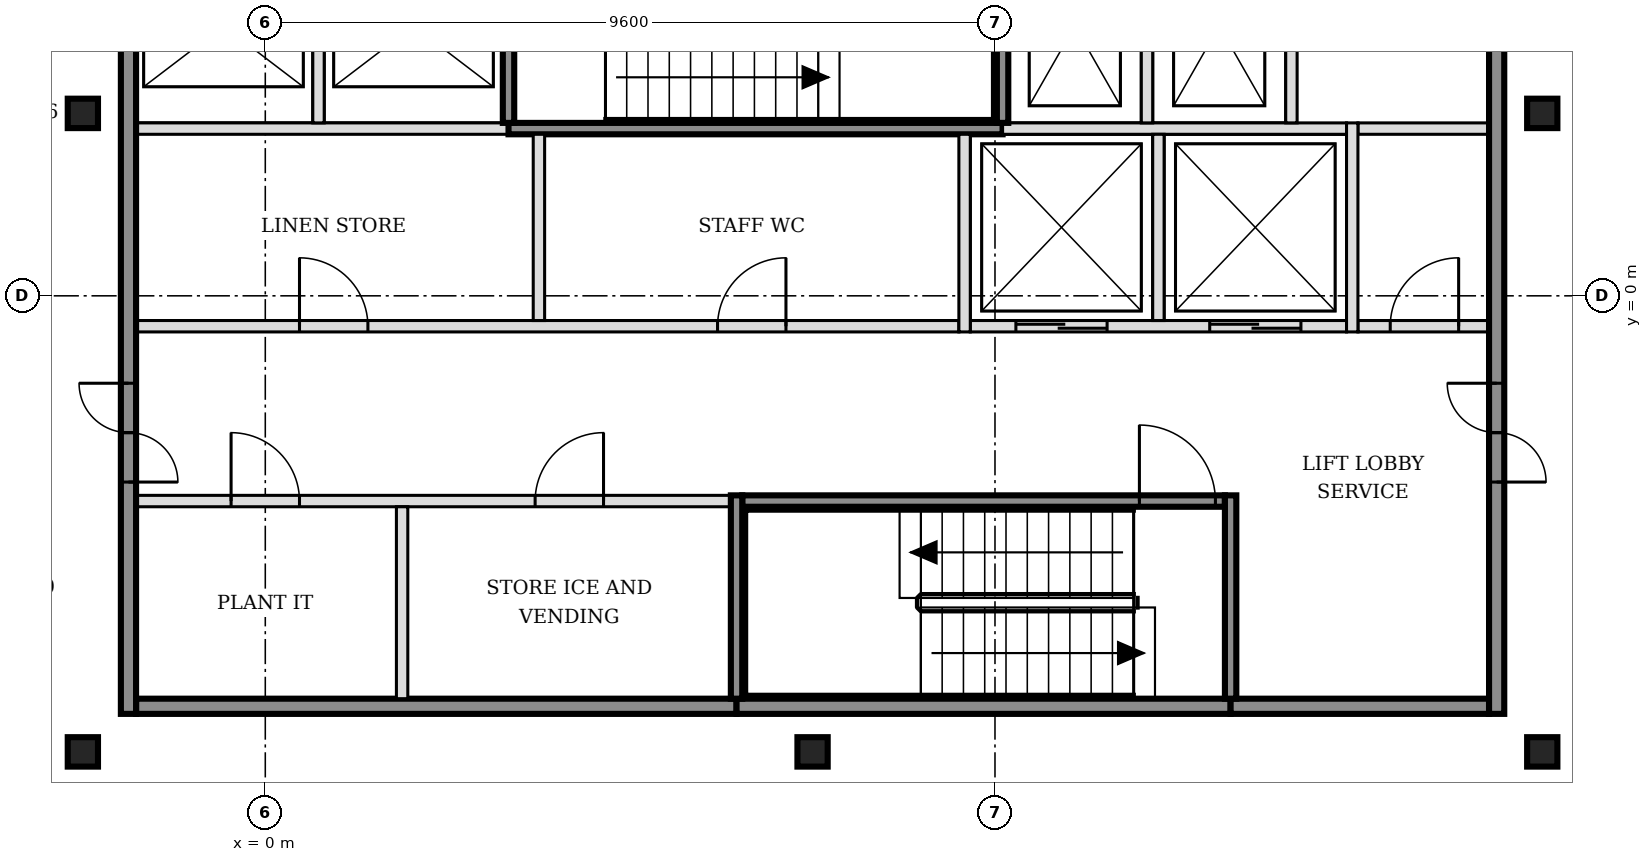
"""IFC4 building model, lengths in metres.
Left out: names, types, materials, properties, quantities, classifications, styles, units other than length and angle.
Written with IfcOpenShell. Run it as: python <this file> out.ifc"""

import sys

from ifc_helpers import new_model, si_unit, direction, frame, frame_2d, origin, origin_2d, place, context, subcontext, project, spatial, rectangle, i_section, extrude, element, fill, save


model = new_model("IFC4")
c1 = context("Model", 3, precision=1e-05, world=origin(), true_north=direction((0.0, 1.0)))
c2 = subcontext(c1, "Body", "Model", "MODEL_VIEW")
j1 = project(units=[si_unit("LENGTHUNIT", "METRE"), si_unit("PLANEANGLEUNIT", "RADIAN")], contexts=[c1])
p1 = place(None, origin())
s1 = spatial("IfcSite", under=j1, at=p1, CompositionType="ELEMENT")
p2 = place(p1, origin())
s2 = spatial("IfcBuilding", under=s1, at=p2, CompositionType="ELEMENT")
p3 = place(p2, frame((0.0, 0.0, 270.6)))
s3 = spatial("IfcBuildingStorey", under=s2, at=p3, CompositionType="ELEMENT", Elevation=270.6)
for number, where, z_axis, x_axis in (
    (1, (-2.4, -6.0, -0.15), (0.0, 0.0, 1.0), (1.0, 0.0, 0.0)),
    (2, (7.2, -6.0, -0.15), (0.0, 0.0, 1.0), (1.0, 0.0, 0.0)),
    (3, (16.8, -6.0, -0.15), (0.0, 0.0, 1.0), (1.0, 0.0, 0.0)),
    (4, (-2.4, 2.4, -0.15), (0.0, 0.0, 1.0), (1.0, 0.0, 0.0)),
    (5, (16.8, 2.4, -0.15), (0.0, 0.0, 1.0), (1.0, 0.0, 0.0)),
):
    element("IfcColumn", number, at=place(p3, frame(where, z_axis=z_axis, x_axis=x_axis)), inside=s3, PredefinedType="COLUMN", context=c2, shape_type="SweptSolid", body=[
        extrude(i_section(OverallWidth=0.398, OverallDepth=0.387, WebThickness=0.021, FlangeThickness=0.033, FilletRadius=0.015, at=origin_2d()), origin(), (0.0, 0.0, 1.0), 3.6),
    ])
p4 = place(p3, frame((-1.7, -5.4, 0.0), z_axis=(0.0, 0.0, 1.0), x_axis=(1.0, 0.0, 0.0)))
e6 = element("IfcWall", 6, at=p4, inside=s3, PredefinedType="SOLIDWALL", context=c2, shape_type="SweptSolid", body=[
    extrude(rectangle(XDim=7.9, YDim=0.2, at=frame_2d((3.95, 0.0))), origin(), (0.0, 0.0, 1.0), 3.45),
])
p5 = place(p3, frame((6.2, -5.4, 0.0), z_axis=(0.0, 0.0, 1.0), x_axis=(1.0, 0.0, 0.0)))
e7 = element("IfcWall", 7, at=p5, inside=s3, PredefinedType="SOLIDWALL", context=c2, shape_type="SweptSolid", body=[
    extrude(rectangle(XDim=6.5, YDim=0.2, at=frame_2d((3.25, 0.0))), origin(), (0.0, 0.0, 1.0), 3.45),
])
p6 = place(p3, frame((12.7, -5.4, 0.0), z_axis=(0.0, 0.0, 1.0), x_axis=(1.0, 0.0, 0.0)))
e8 = element("IfcWall", 8, at=p6, inside=s3, PredefinedType="SOLIDWALL", context=c2, shape_type="SweptSolid", body=[
    extrude(rectangle(XDim=3.4, YDim=0.2, at=frame_2d((1.7, 0.0))), origin(), (0.0, 0.0, 1.0), 3.45),
])
p7 = place(p3, frame((-1.7, -2.7, 0.0), z_axis=(0.0, 0.0, 1.0), x_axis=(1.0, 0.0, 0.0)))
e9 = element("IfcWall", 9, at=p7, inside=s3, PredefinedType="PARTITIONING", context=c2, shape_type="SweptSolid", body=[
    extrude(rectangle(XDim=7.825, YDim=0.15, at=frame_2d((3.913, 0.0))), origin(), (0.0, 0.0, 1.0), 3.45),
])
p8 = place(p7, frame((1.25, 0.0, 0.0)))
e10 = element("IfcOpeningElement", 10, at=p8, cuts=e9, PredefinedType="OPENING", context=c2, shape_type="SweptSolid", body=[
    extrude(rectangle(XDim=0.9, YDim=2.1, at=frame_2d((0.45, 1.05))), frame((0.0, 0.085, 0.0), z_axis=(0.0, -1.0, 0.0), x_axis=(1.0, 0.0, 0.0)), (0.0, 0.0, 1.0), 0.17),
])
p9 = place(p7, frame((5.25, 0.0, 0.0)))
e11 = element("IfcOpeningElement", 11, at=p9, cuts=e9, PredefinedType="OPENING", context=c2, shape_type="SweptSolid", body=[
    extrude(rectangle(XDim=0.9, YDim=2.1, at=frame_2d((0.45, 1.05))), frame((0.0, 0.085, 0.0), z_axis=(0.0, -1.0, 0.0), x_axis=(1.0, 0.0, 0.0)), (0.0, 0.0, 1.0), 0.17),
])
p10 = place(p3, frame((6.275, -2.7, 0.0), z_axis=(0.0, 0.0, 1.0), x_axis=(1.0, 0.0, 0.0)))
e12 = element("IfcWall", 12, at=p10, inside=s3, PredefinedType="SOLIDWALL", context=c2, shape_type="SweptSolid", body=[
    extrude(rectangle(XDim=6.35, YDim=0.15, at=frame_2d((3.175, 0.0))), origin(), (0.0, 0.0, 1.0), 3.45),
])
p11 = place(p10, frame((5.225, 0.0, 0.0)))
e13 = element("IfcOpeningElement", 13, at=p11, cuts=e12, PredefinedType="OPENING", context=c2, shape_type="SweptSolid", body=[
    extrude(rectangle(XDim=1.0, YDim=2.1, at=frame_2d((0.5, 1.05))), frame((0.0, 0.085, 0.0), z_axis=(0.0, -1.0, 0.0), x_axis=(1.0, 0.0, 0.0)), (0.0, 0.0, 1.0), 0.17),
])
p12 = place(p3, frame((-1.7, -0.4, 0.0), z_axis=(0.0, 0.0, 1.0), x_axis=(1.0, 0.0, 0.0)))
e14 = element("IfcWall", 14, at=p12, inside=s3, PredefinedType="PARTITIONING", context=c2, shape_type="SweptSolid", body=[
    extrude(rectangle(XDim=10.825, YDim=0.15, at=frame_2d((5.413, 0.0))), origin(), (0.0, 0.0, 1.0), 3.45),
])
p13 = place(p12, frame((2.15, 0.0, 0.0)))
e15 = element("IfcOpeningElement", 15, at=p13, cuts=e14, PredefinedType="OPENING", context=c2, shape_type="SweptSolid", body=[
    extrude(rectangle(XDim=0.9, YDim=2.1, at=frame_2d((0.45, 1.05))), frame((0.0, 0.085, 0.0), z_axis=(0.0, -1.0, 0.0), x_axis=(1.0, 0.0, 0.0)), (0.0, 0.0, 1.0), 0.17),
])
p14 = place(p12, frame((7.65, 0.0, 0.0)))
e16 = element("IfcOpeningElement", 16, at=p14, cuts=e14, PredefinedType="OPENING", context=c2, shape_type="SweptSolid", body=[
    extrude(rectangle(XDim=0.9, YDim=2.1, at=frame_2d((0.45, 1.05))), frame((0.0, 0.085, 0.0), z_axis=(0.0, -1.0, 0.0), x_axis=(1.0, 0.0, 0.0)), (0.0, 0.0, 1.0), 0.17),
])
p15 = place(p3, frame((9.275, -0.4, 0.0), z_axis=(0.0, 0.0, 1.0), x_axis=(1.0, 0.0, 0.0)))
e17 = element("IfcWall", 17, at=p15, inside=s3, PredefinedType="SOLIDWALL", context=c2, shape_type="SweptSolid", body=[
    extrude(rectangle(XDim=4.95, YDim=0.15, at=frame_2d((2.475, 0.0))), origin(), (0.0, 0.0, 1.0), 3.45),
])
p16 = place(p15, frame((0.6, 0.0, 0.0)))
e18 = element("IfcOpeningElement", 18, at=p16, cuts=e17, PredefinedType="OPENING", context=c2, shape_type="SweptSolid", body=[
    extrude(rectangle(XDim=1.2, YDim=2.1, at=frame_2d((0.6, 1.05))), frame((0.0, 0.085, 0.0), z_axis=(0.0, -1.0, 0.0), x_axis=(1.0, 0.0, 0.0)), (0.0, 0.0, 1.0), 0.17),
])
p17 = place(p15, frame((3.15, 0.0, 0.0)))
e19 = element("IfcOpeningElement", 19, at=p17, cuts=e17, PredefinedType="OPENING", context=c2, shape_type="SweptSolid", body=[
    extrude(rectangle(XDim=1.2, YDim=2.1, at=frame_2d((0.6, 1.05))), frame((0.0, 0.085, 0.0), z_axis=(0.0, -1.0, 0.0), x_axis=(1.0, 0.0, 0.0)), (0.0, 0.0, 1.0), 0.17),
])
p18 = place(p3, frame((14.375, -0.4, 0.0), z_axis=(0.0, 0.0, 1.0), x_axis=(1.0, 0.0, 0.0)))
e20 = element("IfcWall", 20, at=p18, inside=s3, PredefinedType="PARTITIONING", context=c2, shape_type="SweptSolid", body=[
    extrude(rectangle(XDim=1.725, YDim=0.15, at=frame_2d((0.863, 0.0))), origin(), (0.0, 0.0, 1.0), 3.45),
])
p19 = place(p18, frame((0.425, 0.0, 0.0)))
e21 = element("IfcOpeningElement", 21, at=p19, cuts=e20, PredefinedType="OPENING", context=c2, shape_type="SweptSolid", body=[
    extrude(rectangle(XDim=0.9, YDim=2.1, at=frame_2d((0.45, 1.05))), frame((0.0, 0.085, 0.0), z_axis=(0.0, -1.0, 0.0), x_axis=(1.0, 0.0, 0.0)), (0.0, 0.0, 1.0), 0.17),
])
p20 = place(p3, frame((-1.7, 2.2, 0.0), z_axis=(0.0, 0.0, 1.0), x_axis=(1.0, 0.0, 0.0)))
e22 = element("IfcWall", 22, at=p20, inside=s3, PredefinedType="SOLIDWALL", context=c2, shape_type="SweptSolid", body=[
    extrude(rectangle(XDim=4.9, YDim=0.15, at=frame_2d((2.45, 0.0))), origin(), (0.0, 0.0, 1.0), 3.45),
])
p21 = place(p3, frame((3.2, 2.2, 0.0), z_axis=(0.0, 0.0, 1.0), x_axis=(1.0, 0.0, 0.0)))
e23 = element("IfcWall", 23, at=p21, inside=s3, PredefinedType="SOLIDWALL", context=c2, shape_type="SweptSolid", body=[
    extrude(rectangle(XDim=6.5, YDim=0.15, at=frame_2d((3.25, 0.0))), origin(), (0.0, 0.0, 1.0), 3.45),
])
p22 = place(p3, frame((9.7, 2.2, 0.0), z_axis=(0.0, 0.0, 1.0), x_axis=(1.0, 0.0, 0.0)))
e24 = element("IfcWall", 24, at=p22, inside=s3, PredefinedType="SOLIDWALL", context=c2, shape_type="SweptSolid", body=[
    extrude(rectangle(XDim=4.525, YDim=0.15, at=frame_2d((2.263, 0.0))), origin(), (0.0, 0.0, 1.0), 3.45),
])
p23 = place(p3, frame((14.375, 2.2, 0.0), z_axis=(0.0, 0.0, 1.0), x_axis=(1.0, 0.0, 0.0)))
e25 = element("IfcWall", 25, at=p23, inside=s3, PredefinedType="PARTITIONING", context=c2, shape_type="SweptSolid", body=[
    extrude(rectangle(XDim=1.725, YDim=0.15, at=frame_2d((0.863, 0.0))), origin(), (0.0, 0.0, 1.0), 3.45),
])
p24 = place(p3, frame((-1.8, -5.5, 0.0), z_axis=(0.0, 0.0, 1.0), x_axis=(0.0, 1.0, 0.0)))
e26 = element("IfcWall", 26, at=p24, inside=s3, PredefinedType="SOLIDWALL", context=c2, shape_type="SweptSolid", body=[
    extrude(rectangle(XDim=15.8, YDim=0.2, at=frame_2d((7.9, 0.0))), origin(), (0.0, 0.0, 1.0), 3.45),
])
p25 = place(p24, frame((3.05, 0.0, 0.0)))
e27 = element("IfcOpeningElement", 27, at=p25, cuts=e26, PredefinedType="OPENING", context=c2, shape_type="SweptSolid", body=[
    extrude(rectangle(XDim=1.3, YDim=2.1, at=frame_2d((0.65, 1.05))), frame((0.0, 0.11, 0.0), z_axis=(0.0, -1.0, 0.0), x_axis=(1.0, 0.0, 0.0)), (0.0, 0.0, 1.0), 0.22),
])
p26 = place(p24, frame((11.45, 0.0, 0.0)))
e28 = element("IfcOpeningElement", 28, at=p26, cuts=e26, PredefinedType="OPENING", context=c2, shape_type="SweptSolid", body=[
    extrude(rectangle(XDim=1.3, YDim=2.1, at=frame_2d((0.65, 1.05))), frame((0.0, 0.11, 0.0), z_axis=(0.0, -1.0, 0.0), x_axis=(1.0, 0.0, 0.0)), (0.0, 0.0, 1.0), 0.22),
])
p27 = place(p3, frame((0.7, 2.275, 0.0), z_axis=(0.0, 0.0, 1.0), x_axis=(0.0, 1.0, 0.0)))
e29 = element("IfcWall", 29, at=p27, inside=s3, PredefinedType="SOLIDWALL", context=c2, shape_type="SweptSolid", body=[
    extrude(rectangle(XDim=2.55, YDim=0.15, at=frame_2d((1.275, 0.0))), origin(), (0.0, 0.0, 1.0), 3.45),
])
p28 = place(p3, frame((1.8, -5.3, 0.0), z_axis=(0.0, 0.0, 1.0), x_axis=(0.0, 1.0, 0.0)))
e30 = element("IfcWall", 30, at=p28, inside=s3, PredefinedType="PARTITIONING", context=c2, shape_type="SweptSolid", body=[
    extrude(rectangle(XDim=2.525, YDim=0.15, at=frame_2d((1.263, 0.0))), origin(), (0.0, 0.0, 1.0), 3.45),
])
p29 = place(p3, frame((3.2, 2.275, 0.0), z_axis=(0.0, 0.0, 1.0), x_axis=(0.0, 1.0, 0.0)))
e31 = element("IfcWall", 31, at=p29, inside=s3, PredefinedType="SOLIDWALL", context=c2, shape_type="SweptSolid", body=[
    extrude(rectangle(XDim=2.55, YDim=0.15, at=frame_2d((1.275, 0.0))), origin(), (0.0, 0.0, 1.0), 3.45),
])
p30 = place(p3, frame((3.6, -0.325, 0.0), z_axis=(0.0, 0.0, 1.0), x_axis=(0.0, 1.0, 0.0)))
e32 = element("IfcWall", 32, at=p30, inside=s3, PredefinedType="PARTITIONING", context=c2, shape_type="SweptSolid", body=[
    extrude(rectangle(XDim=2.45, YDim=0.15, at=frame_2d((1.225, 0.0))), origin(), (0.0, 0.0, 1.0), 3.45),
])
p31 = place(p3, frame((6.2, -5.3, 0.0), z_axis=(0.0, 0.0, 1.0), x_axis=(0.0, 1.0, 0.0)))
e33 = element("IfcWall", 33, at=p31, inside=s3, PredefinedType="SOLIDWALL", context=c2, shape_type="SweptSolid", body=[
    extrude(rectangle(XDim=2.675, YDim=0.15, at=frame_2d((1.337, 0.0))), origin(), (0.0, 0.0, 1.0), 3.45),
])
p32 = place(p3, frame((9.2, -0.475, 0.0), z_axis=(0.0, 0.0, 1.0), x_axis=(0.0, 1.0, 0.0)))
e34 = element("IfcWall", 34, at=p32, inside=s3, PredefinedType="SOLIDWALL", context=c2, shape_type="SweptSolid", body=[
    extrude(rectangle(XDim=2.6, YDim=0.15, at=frame_2d((1.3, 0.0))), origin(), (0.0, 0.0, 1.0), 3.45),
])
for number, where, z_axis, x_axis in (
    (35, (9.7, 2.275, 0.0), (0.0, 0.0, 1.0), (0.0, 1.0, 0.0)),
    (36, (11.6, 2.275, 0.0), (0.0, 0.0, 1.0), (0.0, 1.0, 0.0)),
):
    element("IfcWall", number, at=place(p3, frame(where, z_axis=z_axis, x_axis=x_axis)), inside=s3, PredefinedType="SOLIDWALL", context=c2, shape_type="SweptSolid", body=[
        extrude(rectangle(XDim=2.55, YDim=0.15, at=frame_2d((1.275, 0.0))), origin(), (0.0, 0.0, 1.0), 3.45),
    ])
p33 = place(p3, frame((11.75, -0.325, 0.0), z_axis=(0.0, 0.0, 1.0), x_axis=(0.0, 1.0, 0.0)))
e37 = element("IfcWall", 37, at=p33, inside=s3, PredefinedType="SOLIDWALL", context=c2, shape_type="SweptSolid", body=[
    extrude(rectangle(XDim=2.45, YDim=0.15, at=frame_2d((1.225, 0.0))), origin(), (0.0, 0.0, 1.0), 3.45),
])
p34 = place(p3, frame((12.7, -5.3, 0.0), z_axis=(0.0, 0.0, 1.0), x_axis=(0.0, 1.0, 0.0)))
e38 = element("IfcWall", 38, at=p34, inside=s3, PredefinedType="SOLIDWALL", context=c2, shape_type="SweptSolid", body=[
    extrude(rectangle(XDim=2.675, YDim=0.15, at=frame_2d((1.337, 0.0))), origin(), (0.0, 0.0, 1.0), 3.45),
])
p35 = place(p3, frame((13.5, 2.275, 0.0), z_axis=(0.0, 0.0, 1.0), x_axis=(0.0, 1.0, 0.0)))
e39 = element("IfcWall", 39, at=p35, inside=s3, PredefinedType="SOLIDWALL", context=c2, shape_type="SweptSolid", body=[
    extrude(rectangle(XDim=2.55, YDim=0.15, at=frame_2d((1.275, 0.0))), origin(), (0.0, 0.0, 1.0), 3.45),
])
p36 = place(p3, frame((14.3, -0.475, 0.0), z_axis=(0.0, 0.0, 1.0), x_axis=(0.0, 1.0, 0.0)))
e40 = element("IfcWall", 40, at=p36, inside=s3, PredefinedType="SOLIDWALL", context=c2, shape_type="SweptSolid", body=[
    extrude(rectangle(XDim=2.75, YDim=0.15, at=frame_2d((1.375, 0.0))), origin(), (0.0, 0.0, 1.0), 3.45),
])
p37 = place(p3, frame((16.2, -5.5, 0.0), z_axis=(0.0, 0.0, 1.0), x_axis=(0.0, 1.0, 0.0)))
e41 = element("IfcWall", 41, at=p37, inside=s3, PredefinedType="SOLIDWALL", context=c2, shape_type="SweptSolid", body=[
    extrude(rectangle(XDim=15.8, YDim=0.2, at=frame_2d((7.9, 0.0))), origin(), (0.0, 0.0, 1.0), 3.45),
])
p38 = place(p37, frame((3.05, 0.0, 0.0)))
e42 = element("IfcOpeningElement", 42, at=p38, cuts=e41, PredefinedType="OPENING", context=c2, shape_type="SweptSolid", body=[
    extrude(rectangle(XDim=1.3, YDim=2.1, at=frame_2d((0.65, 1.05))), frame((0.0, 0.11, 0.0), z_axis=(0.0, -1.0, 0.0), x_axis=(1.0, 0.0, 0.0)), (0.0, 0.0, 1.0), 0.22),
])
p39 = place(p37, frame((11.45, 0.0, 0.0)))
e43 = element("IfcOpeningElement", 43, at=p39, cuts=e41, PredefinedType="OPENING", context=c2, shape_type="SweptSolid", body=[
    extrude(rectangle(XDim=1.3, YDim=2.1, at=frame_2d((0.65, 1.05))), frame((0.0, 0.11, 0.0), z_axis=(0.0, -1.0, 0.0), x_axis=(1.0, 0.0, 0.0)), (0.0, 0.0, 1.0), 0.22),
])
p40 = place(p16, origin())
e44 = element("IfcDoor", 44, at=p40, inside=s3, OperationType="DOUBLE_DOOR_SLIDING", PredefinedType="DOOR", context=c2, shape_type="SweptSolid", body=[
    extrude(rectangle(XDim=1.2, YDim=2.1, at=frame_2d((0.6, 1.05))), frame((0.0, 0.025, 0.0), z_axis=(0.0, -1.0, 0.0), x_axis=(1.0, 0.0, 0.0)), (0.0, 0.0, 1.0), 0.05),
])
fill(e18, e44)
p41 = place(p17, origin())
e45 = element("IfcDoor", 45, at=p41, inside=s3, OperationType="DOUBLE_DOOR_SLIDING", PredefinedType="DOOR", context=c2, shape_type="SweptSolid", body=[
    extrude(rectangle(XDim=1.2, YDim=2.1, at=frame_2d((0.6, 1.05))), frame((0.0, 0.025, 0.0), z_axis=(0.0, -1.0, 0.0), x_axis=(1.0, 0.0, 0.0)), (0.0, 0.0, 1.0), 0.05),
])
fill(e19, e45)
p42 = place(p11, origin())
e46 = element("IfcDoor", 46, at=p42, inside=s3, OperationType="SINGLE_SWING_LEFT", PredefinedType="DOOR", context=c2, shape_type="SweptSolid", body=[
    extrude(rectangle(XDim=1.0, YDim=2.1, at=frame_2d((0.5, 1.05))), frame((0.0, 0.025, 0.0), z_axis=(0.0, -1.0, 0.0), x_axis=(1.0, 0.0, 0.0)), (0.0, 0.0, 1.0), 0.05),
])
fill(e13, e46)
p43 = place(p25, origin())
e47 = element("IfcDoor", 47, at=p43, inside=s3, OperationType="DOUBLE_DOOR_SINGLE_SWING", PredefinedType="DOOR", context=c2, shape_type="SweptSolid", body=[
    extrude(rectangle(XDim=1.3, YDim=2.1, at=frame_2d((0.65, 1.05))), frame((0.0, 0.025, 0.0), z_axis=(0.0, -1.0, 0.0), x_axis=(1.0, 0.0, 0.0)), (0.0, 0.0, 1.0), 0.05),
])
fill(e27, e47)
p44 = place(p38, origin())
e48 = element("IfcDoor", 48, at=p44, inside=s3, OperationType="DOUBLE_DOOR_SINGLE_SWING", PredefinedType="DOOR", context=c2, shape_type="SweptSolid", body=[
    extrude(rectangle(XDim=1.3, YDim=2.1, at=frame_2d((0.65, 1.05))), frame((0.0, 0.025, 0.0), z_axis=(0.0, -1.0, 0.0), x_axis=(1.0, 0.0, 0.0)), (0.0, 0.0, 1.0), 0.05),
])
fill(e42, e48)
p45 = place(p19, origin())
e49 = element("IfcDoor", 49, at=p45, inside=s3, OperationType="SINGLE_SWING_RIGHT", PredefinedType="DOOR", context=c2, shape_type="SweptSolid", body=[
    extrude(rectangle(XDim=0.9, YDim=2.1, at=frame_2d((0.45, 1.05))), frame((0.0, 0.025, 0.0), z_axis=(0.0, -1.0, 0.0), x_axis=(1.0, 0.0, 0.0)), (0.0, 0.0, 1.0), 0.05),
])
fill(e21, e49)
p46 = place(p8, origin())
e50 = element("IfcDoor", 50, at=p46, inside=s3, OperationType="SINGLE_SWING_LEFT", PredefinedType="DOOR", context=c2, shape_type="SweptSolid", body=[
    extrude(rectangle(XDim=0.9, YDim=2.1, at=frame_2d((0.45, 1.05))), frame((0.0, 0.025, 0.0), z_axis=(0.0, -1.0, 0.0), x_axis=(1.0, 0.0, 0.0)), (0.0, 0.0, 1.0), 0.05),
])
fill(e10, e50)
p47 = place(p9, origin())
e51 = element("IfcDoor", 51, at=p47, inside=s3, OperationType="SINGLE_SWING_RIGHT", PredefinedType="DOOR", context=c2, shape_type="SweptSolid", body=[
    extrude(rectangle(XDim=0.9, YDim=2.1, at=frame_2d((0.45, 1.05))), frame((0.0, 0.025, 0.0), z_axis=(0.0, -1.0, 0.0), x_axis=(1.0, 0.0, 0.0)), (0.0, 0.0, 1.0), 0.05),
])
fill(e11, e51)
p48 = place(p13, origin())
e52 = element("IfcDoor", 52, at=p48, inside=s3, OperationType="SINGLE_SWING_LEFT", PredefinedType="DOOR", context=c2, shape_type="SweptSolid", body=[
    extrude(rectangle(XDim=0.9, YDim=2.1, at=frame_2d((0.45, 1.05))), frame((0.0, 0.025, 0.0), z_axis=(0.0, -1.0, 0.0), x_axis=(1.0, 0.0, 0.0)), (0.0, 0.0, 1.0), 0.05),
])
fill(e15, e52)
p49 = place(p14, origin())
e53 = element("IfcDoor", 53, at=p49, inside=s3, OperationType="SINGLE_SWING_RIGHT", PredefinedType="DOOR", context=c2, shape_type="SweptSolid", body=[
    extrude(rectangle(XDim=0.9, YDim=2.1, at=frame_2d((0.45, 1.05))), frame((0.0, 0.025, 0.0), z_axis=(0.0, -1.0, 0.0), x_axis=(1.0, 0.0, 0.0)), (0.0, 0.0, 1.0), 0.05),
])
fill(e16, e53)
save(model, sys.argv[1])
